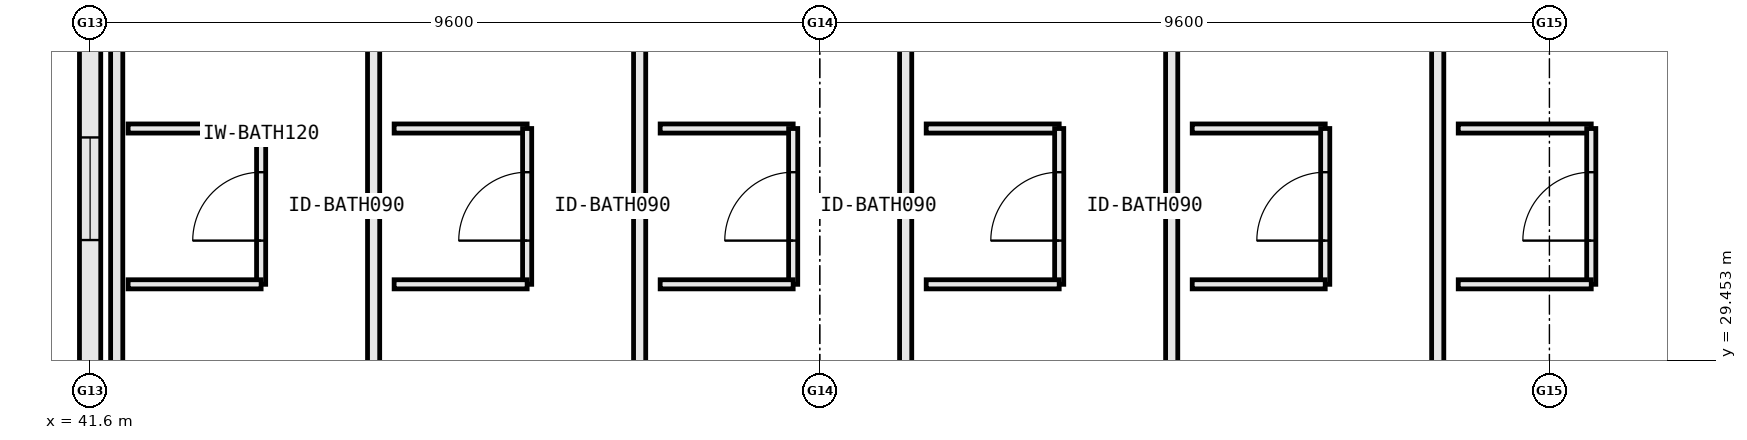
"""IFC4 building model, lengths in metres.
Left out: names, types, materials, properties, quantities, classifications, styles, units other than length and angle.
Written with IfcOpenShell. Run it as: python <this file> out.ifc"""

import sys

from ifc_helpers import new_model, si_unit, direction, frame, frame_2d, origin, place, context, subcontext, project, spatial, rectangle, extrude, element, fill, save


model = new_model("IFC4")
c1 = context("Model", 3, precision=1e-05, world=origin(), true_north=direction((0.0, 1.0)))
c2 = subcontext(c1, "Body", "Model", "MODEL_VIEW")
j1 = project(units=[si_unit("LENGTHUNIT", "METRE"), si_unit("PLANEANGLEUNIT", "RADIAN")], contexts=[c1])
p1 = place(None, origin())
s1 = spatial("IfcSite", under=j1, at=p1, CompositionType="ELEMENT")
p2 = place(p1, origin())
s2 = spatial("IfcBuilding", under=s1, at=p2, CompositionType="ELEMENT")
p3 = place(p2, frame((0.0, 0.0, 35.2)))
s3 = spatial("IfcBuildingStorey", under=s2, at=p3, CompositionType="ELEMENT", Elevation=35.2)
p4 = place(p3, frame((41.6, 36.192, 0.0), z_axis=(0.0, 0.0, 1.0), x_axis=(0.0, -1.0, 0.0)))
e1 = element("IfcWall", 1, at=p4, inside=s3, PredefinedType="STANDARD", context=c2, shape_type="SweptSolid", body=[
    extrude(rectangle(XDim=8.969, YDim=0.28, at=frame_2d((4.484, 0.0))), origin(), (0.0, 0.0, 1.0), 2.94),
])
p5 = place(p4, frame((3.81, 0.0, 0.85)))
e2 = element("IfcOpeningElement", 2, at=p5, cuts=e1, PredefinedType="OPENING", context=c2, shape_type="SweptSolid", body=[
    extrude(rectangle(XDim=1.35, YDim=1.65, at=frame_2d((0.675, 0.825))), frame((0.0, 0.152, 0.0), z_axis=(0.0, -1.0, 0.0), x_axis=(1.0, 0.0, 0.0)), (0.0, 0.0, 1.0), 0.304),
])
p6 = place(p3, frame((41.95, 27.16, 0.0), z_axis=(0.0, 0.0, 1.0), x_axis=(0.0, 1.0, 0.0)))
e3 = element("IfcWall", 3, at=p6, inside=s3, PredefinedType="PARTITIONING", context=c2, shape_type="SweptSolid", body=[
    extrude(rectangle(XDim=10.34, YDim=0.16, at=frame_2d((5.17, 0.0))), origin(), (0.0, 0.0, 1.0), 2.92),
])
p7 = place(p3, frame((45.33, 27.16, 0.0), z_axis=(0.0, 0.0, 1.0), x_axis=(0.0, 1.0, 0.0)))
e4 = element("IfcWall", 4, at=p7, inside=s3, PredefinedType="PARTITIONING", context=c2, shape_type="SweptSolid", body=[
    extrude(rectangle(XDim=10.34, YDim=0.16, at=frame_2d((5.17, 0.0))), origin(), (0.0, 0.0, 1.0), 3.565),
])
p8 = place(p3, frame((42.1, 32.5, 0.0), z_axis=(0.0, 0.0, 1.0), x_axis=(1.0, 0.0, 0.0)))
e5 = element("IfcWall", 5, at=p8, inside=s3, PredefinedType="PARTITIONING", context=c2, shape_type="SweptSolid", body=[
    extrude(rectangle(XDim=1.75, YDim=0.12, at=frame_2d((0.875, 0.0))), origin(), (0.0, 0.0, 1.0), 3.565),
])
p9 = place(p3, frame((43.85, 30.45, 0.0), z_axis=(0.0, 0.0, 1.0), x_axis=(0.0, 1.0, 0.0)))
e6 = element("IfcWall", 6, at=p9, inside=s3, PredefinedType="PARTITIONING", context=c2, shape_type="SweptSolid", body=[
    extrude(rectangle(XDim=2.05, YDim=0.12, at=frame_2d((1.025, 0.0))), origin(), (0.0, 0.0, 1.0), 3.11),
])
p10 = place(p9, frame((0.575, 0.0, 0.0)))
e7 = element("IfcOpeningElement", 7, at=p10, cuts=e6, PredefinedType="OPENING", context=c2, shape_type="SweptSolid", body=[
    extrude(rectangle(XDim=0.9, YDim=2.15, at=frame_2d((0.45, 1.075))), frame((0.0, 0.072, 0.0), z_axis=(0.0, -1.0, 0.0), x_axis=(1.0, 0.0, 0.0)), (0.0, 0.0, 1.0), 0.144),
])
p11 = place(p3, frame((42.1, 30.45, 0.0), z_axis=(0.0, 0.0, 1.0), x_axis=(1.0, 0.0, 0.0)))
e8 = element("IfcWall", 8, at=p11, inside=s3, PredefinedType="PARTITIONING", context=c2, shape_type="SweptSolid", body=[
    extrude(rectangle(XDim=1.75, YDim=0.12, at=frame_2d((0.875, 0.0))), origin(), (0.0, 0.0, 1.0), 3.565),
])
p12 = place(p3, frame((48.83, 27.16, 0.0), z_axis=(0.0, 0.0, 1.0), x_axis=(0.0, 1.0, 0.0)))
e9 = element("IfcWall", 9, at=p12, inside=s3, PredefinedType="PARTITIONING", context=c2, shape_type="SweptSolid", body=[
    extrude(rectangle(XDim=10.34, YDim=0.16, at=frame_2d((5.17, 0.0))), origin(), (0.0, 0.0, 1.0), 3.11),
])
p13 = place(p3, frame((45.6, 32.5, 0.0), z_axis=(0.0, 0.0, 1.0), x_axis=(1.0, 0.0, 0.0)))
e10 = element("IfcWall", 10, at=p13, inside=s3, PredefinedType="PARTITIONING", context=c2, shape_type="SweptSolid", body=[
    extrude(rectangle(XDim=1.75, YDim=0.12, at=frame_2d((0.875, 0.0))), origin(), (0.0, 0.0, 1.0), 3.565),
])
p14 = place(p3, frame((47.35, 30.45, 0.0), z_axis=(0.0, 0.0, 1.0), x_axis=(0.0, 1.0, 0.0)))
e11 = element("IfcWall", 11, at=p14, inside=s3, PredefinedType="PARTITIONING", context=c2, shape_type="SweptSolid", body=[
    extrude(rectangle(XDim=2.05, YDim=0.12, at=frame_2d((1.025, 0.0))), origin(), (0.0, 0.0, 1.0), 3.565),
])
p15 = place(p14, frame((0.575, 0.0, 0.0)))
e12 = element("IfcOpeningElement", 12, at=p15, cuts=e11, PredefinedType="OPENING", context=c2, shape_type="SweptSolid", body=[
    extrude(rectangle(XDim=0.9, YDim=2.15, at=frame_2d((0.45, 1.075))), frame((0.0, 0.072, 0.0), z_axis=(0.0, -1.0, 0.0), x_axis=(1.0, 0.0, 0.0)), (0.0, 0.0, 1.0), 0.144),
])
p16 = place(p3, frame((45.6, 30.45, 0.0), z_axis=(0.0, 0.0, 1.0), x_axis=(1.0, 0.0, 0.0)))
e13 = element("IfcWall", 13, at=p16, inside=s3, PredefinedType="PARTITIONING", context=c2, shape_type="SweptSolid", body=[
    extrude(rectangle(XDim=1.75, YDim=0.12, at=frame_2d((0.875, 0.0))), origin(), (0.0, 0.0, 1.0), 3.565),
])
p17 = place(p3, frame((52.33, 27.16, 0.0), z_axis=(0.0, 0.0, 1.0), x_axis=(0.0, 1.0, 0.0)))
e14 = element("IfcWall", 14, at=p17, inside=s3, PredefinedType="PARTITIONING", context=c2, shape_type="SweptSolid", body=[
    extrude(rectangle(XDim=10.34, YDim=0.16, at=frame_2d((5.17, 0.0))), origin(), (0.0, 0.0, 1.0), 3.565),
])
p18 = place(p3, frame((49.1, 32.5, 0.0), z_axis=(0.0, 0.0, 1.0), x_axis=(1.0, 0.0, 0.0)))
e15 = element("IfcWall", 15, at=p18, inside=s3, PredefinedType="PARTITIONING", context=c2, shape_type="SweptSolid", body=[
    extrude(rectangle(XDim=1.75, YDim=0.12, at=frame_2d((0.875, 0.0))), origin(), (0.0, 0.0, 1.0), 3.565),
])
p19 = place(p3, frame((50.85, 30.45, 0.0), z_axis=(0.0, 0.0, 1.0), x_axis=(0.0, 1.0, 0.0)))
e16 = element("IfcWall", 16, at=p19, inside=s3, PredefinedType="PARTITIONING", context=c2, shape_type="SweptSolid", body=[
    extrude(rectangle(XDim=2.05, YDim=0.12, at=frame_2d((1.025, 0.0))), origin(), (0.0, 0.0, 1.0), 2.94),
])
p20 = place(p19, frame((0.575, 0.0, 0.0)))
e17 = element("IfcOpeningElement", 17, at=p20, cuts=e16, PredefinedType="OPENING", context=c2, shape_type="SweptSolid", body=[
    extrude(rectangle(XDim=0.9, YDim=2.15, at=frame_2d((0.45, 1.075))), frame((0.0, 0.072, 0.0), z_axis=(0.0, -1.0, 0.0), x_axis=(1.0, 0.0, 0.0)), (0.0, 0.0, 1.0), 0.144),
])
p21 = place(p3, frame((49.1, 30.45, 0.0), z_axis=(0.0, 0.0, 1.0), x_axis=(1.0, 0.0, 0.0)))
e18 = element("IfcWall", 18, at=p21, inside=s3, PredefinedType="PARTITIONING", context=c2, shape_type="SweptSolid", body=[
    extrude(rectangle(XDim=1.75, YDim=0.12, at=frame_2d((0.875, 0.0))), origin(), (0.0, 0.0, 1.0), 3.565),
])
p22 = place(p3, frame((55.83, 27.16, 0.0), z_axis=(0.0, 0.0, 1.0), x_axis=(0.0, 1.0, 0.0)))
e19 = element("IfcWall", 19, at=p22, inside=s3, PredefinedType="PARTITIONING", context=c2, shape_type="SweptSolid", body=[
    extrude(rectangle(XDim=10.34, YDim=0.16, at=frame_2d((5.17, 0.0))), origin(), (0.0, 0.0, 1.0), 3.565),
])
p23 = place(p3, frame((52.6, 32.5, 0.0), z_axis=(0.0, 0.0, 1.0), x_axis=(1.0, 0.0, 0.0)))
e20 = element("IfcWall", 20, at=p23, inside=s3, PredefinedType="PARTITIONING", context=c2, shape_type="SweptSolid", body=[
    extrude(rectangle(XDim=1.75, YDim=0.12, at=frame_2d((0.875, 0.0))), origin(), (0.0, 0.0, 1.0), 3.565),
])
p24 = place(p3, frame((54.35, 30.45, 0.0), z_axis=(0.0, 0.0, 1.0), x_axis=(0.0, 1.0, 0.0)))
e21 = element("IfcWall", 21, at=p24, inside=s3, PredefinedType="PARTITIONING", context=c2, shape_type="SweptSolid", body=[
    extrude(rectangle(XDim=2.05, YDim=0.12, at=frame_2d((1.025, 0.0))), origin(), (0.0, 0.0, 1.0), 3.11),
])
p25 = place(p24, frame((0.575, 0.0, 0.0)))
e22 = element("IfcOpeningElement", 22, at=p25, cuts=e21, PredefinedType="OPENING", context=c2, shape_type="SweptSolid", body=[
    extrude(rectangle(XDim=0.9, YDim=2.15, at=frame_2d((0.45, 1.075))), frame((0.0, 0.072, 0.0), z_axis=(0.0, -1.0, 0.0), x_axis=(1.0, 0.0, 0.0)), (0.0, 0.0, 1.0), 0.144),
])
p26 = place(p3, frame((52.6, 30.45, 0.0), z_axis=(0.0, 0.0, 1.0), x_axis=(1.0, 0.0, 0.0)))
e23 = element("IfcWall", 23, at=p26, inside=s3, PredefinedType="PARTITIONING", context=c2, shape_type="SweptSolid", body=[
    extrude(rectangle(XDim=1.75, YDim=0.12, at=frame_2d((0.875, 0.0))), origin(), (0.0, 0.0, 1.0), 3.565),
])
p27 = place(p3, frame((59.33, 27.16, 0.0), z_axis=(0.0, 0.0, 1.0), x_axis=(0.0, 1.0, 0.0)))
e24 = element("IfcWall", 24, at=p27, inside=s3, PredefinedType="PARTITIONING", context=c2, shape_type="SweptSolid", body=[
    extrude(rectangle(XDim=10.34, YDim=0.16, at=frame_2d((5.17, 0.0))), origin(), (0.0, 0.0, 1.0), 3.565),
])
p28 = place(p3, frame((56.1, 32.5, 0.0), z_axis=(0.0, 0.0, 1.0), x_axis=(1.0, 0.0, 0.0)))
e25 = element("IfcWall", 25, at=p28, inside=s3, PredefinedType="PARTITIONING", context=c2, shape_type="SweptSolid", body=[
    extrude(rectangle(XDim=1.75, YDim=0.12, at=frame_2d((0.875, 0.0))), origin(), (0.0, 0.0, 1.0), 3.565),
])
p29 = place(p3, frame((57.85, 30.45, 0.0), z_axis=(0.0, 0.0, 1.0), x_axis=(0.0, 1.0, 0.0)))
e26 = element("IfcWall", 26, at=p29, inside=s3, PredefinedType="PARTITIONING", context=c2, shape_type="SweptSolid", body=[
    extrude(rectangle(XDim=2.05, YDim=0.12, at=frame_2d((1.025, 0.0))), origin(), (0.0, 0.0, 1.0), 3.11),
])
p30 = place(p29, frame((0.575, 0.0, 0.0)))
e27 = element("IfcOpeningElement", 27, at=p30, cuts=e26, PredefinedType="OPENING", context=c2, shape_type="SweptSolid", body=[
    extrude(rectangle(XDim=0.9, YDim=2.15, at=frame_2d((0.45, 1.075))), frame((0.0, 0.072, 0.0), z_axis=(0.0, -1.0, 0.0), x_axis=(1.0, 0.0, 0.0)), (0.0, 0.0, 1.0), 0.144),
])
for number, where, z_axis, x_axis in (
    (28, (56.1, 30.45, 0.0), (0.0, 0.0, 1.0), (1.0, 0.0, 0.0)),
    (29, (59.6, 32.5, 0.0), (0.0, 0.0, 1.0), (1.0, 0.0, 0.0)),
):
    element("IfcWall", number, at=place(p3, frame(where, z_axis=z_axis, x_axis=x_axis)), inside=s3, PredefinedType="PARTITIONING", context=c2, shape_type="SweptSolid", body=[
        extrude(rectangle(XDim=1.75, YDim=0.12, at=frame_2d((0.875, 0.0))), origin(), (0.0, 0.0, 1.0), 3.565),
    ])
p31 = place(p3, frame((61.35, 30.45, 0.0), z_axis=(0.0, 0.0, 1.0), x_axis=(0.0, 1.0, 0.0)))
e30 = element("IfcWall", 30, at=p31, inside=s3, PredefinedType="PARTITIONING", context=c2, shape_type="SweptSolid", body=[
    extrude(rectangle(XDim=2.05, YDim=0.12, at=frame_2d((1.025, 0.0))), origin(), (0.0, 0.0, 1.0), 3.565),
])
p32 = place(p31, frame((0.575, 0.0, 0.0)))
e31 = element("IfcOpeningElement", 31, at=p32, cuts=e30, PredefinedType="OPENING", context=c2, shape_type="SweptSolid", body=[
    extrude(rectangle(XDim=0.9, YDim=2.15, at=frame_2d((0.45, 1.075))), frame((0.0, 0.072, 0.0), z_axis=(0.0, -1.0, 0.0), x_axis=(1.0, 0.0, 0.0)), (0.0, 0.0, 1.0), 0.144),
])
p33 = place(p3, frame((59.6, 30.45, 0.0), z_axis=(0.0, 0.0, 1.0), x_axis=(1.0, 0.0, 0.0)))
e32 = element("IfcWall", 32, at=p33, inside=s3, PredefinedType="PARTITIONING", context=c2, shape_type="SweptSolid", body=[
    extrude(rectangle(XDim=1.75, YDim=0.12, at=frame_2d((0.875, 0.0))), origin(), (0.0, 0.0, 1.0), 3.565),
])
p34 = place(p5, origin())
e33 = element("IfcWindow", 33, at=p34, inside=s3, PartitioningType="SINGLE_PANEL", PredefinedType="WINDOW", context=c2, shape_type="SweptSolid", body=[
    extrude(rectangle(XDim=1.35, YDim=1.65, at=frame_2d((0.675, 0.825))), frame((0.0, 0.03, 0.0), z_axis=(0.0, -1.0, 0.0), x_axis=(1.0, 0.0, 0.0)), (0.0, 0.0, 1.0), 0.06),
])
fill(e2, e33)
p35 = place(p10, origin())
e34 = element("IfcDoor", 34, at=p35, inside=s3, OperationType="SINGLE_SWING_LEFT", PredefinedType="DOOR", context=c2, shape_type="SweptSolid", body=[
    extrude(rectangle(XDim=0.9, YDim=2.15, at=frame_2d((0.45, 1.075))), frame((0.0, 0.025, 0.0), z_axis=(0.0, -1.0, 0.0), x_axis=(1.0, 0.0, 0.0)), (0.0, 0.0, 1.0), 0.05),
])
fill(e7, e34)
p36 = place(p15, origin())
e35 = element("IfcDoor", 35, at=p36, inside=s3, OperationType="SINGLE_SWING_LEFT", PredefinedType="DOOR", context=c2, shape_type="SweptSolid", body=[
    extrude(rectangle(XDim=0.9, YDim=2.15, at=frame_2d((0.45, 1.075))), frame((0.0, 0.025, 0.0), z_axis=(0.0, -1.0, 0.0), x_axis=(1.0, 0.0, 0.0)), (0.0, 0.0, 1.0), 0.05),
])
fill(e12, e35)
p37 = place(p20, origin())
e36 = element("IfcDoor", 36, at=p37, inside=s3, OperationType="SINGLE_SWING_LEFT", PredefinedType="DOOR", context=c2, shape_type="SweptSolid", body=[
    extrude(rectangle(XDim=0.9, YDim=2.15, at=frame_2d((0.45, 1.075))), frame((0.0, 0.025, 0.0), z_axis=(0.0, -1.0, 0.0), x_axis=(1.0, 0.0, 0.0)), (0.0, 0.0, 1.0), 0.05),
])
fill(e17, e36)
p38 = place(p25, origin())
e37 = element("IfcDoor", 37, at=p38, inside=s3, OperationType="SINGLE_SWING_LEFT", PredefinedType="DOOR", context=c2, shape_type="SweptSolid", body=[
    extrude(rectangle(XDim=0.9, YDim=2.15, at=frame_2d((0.45, 1.075))), frame((0.0, 0.025, 0.0), z_axis=(0.0, -1.0, 0.0), x_axis=(1.0, 0.0, 0.0)), (0.0, 0.0, 1.0), 0.05),
])
fill(e22, e37)
p39 = place(p30, origin())
e38 = element("IfcDoor", 38, at=p39, inside=s3, OperationType="SINGLE_SWING_LEFT", PredefinedType="DOOR", context=c2, shape_type="SweptSolid", body=[
    extrude(rectangle(XDim=0.9, YDim=2.15, at=frame_2d((0.45, 1.075))), frame((0.0, 0.025, 0.0), z_axis=(0.0, -1.0, 0.0), x_axis=(1.0, 0.0, 0.0)), (0.0, 0.0, 1.0), 0.05),
])
fill(e27, e38)
p40 = place(p32, origin())
e39 = element("IfcDoor", 39, at=p40, inside=s3, OperationType="SINGLE_SWING_LEFT", PredefinedType="DOOR", context=c2, shape_type="SweptSolid", body=[
    extrude(rectangle(XDim=0.9, YDim=2.15, at=frame_2d((0.45, 1.075))), frame((0.0, 0.025, 0.0), z_axis=(0.0, -1.0, 0.0), x_axis=(1.0, 0.0, 0.0)), (0.0, 0.0, 1.0), 0.05),
])
fill(e31, e39)
save(model, sys.argv[1])
